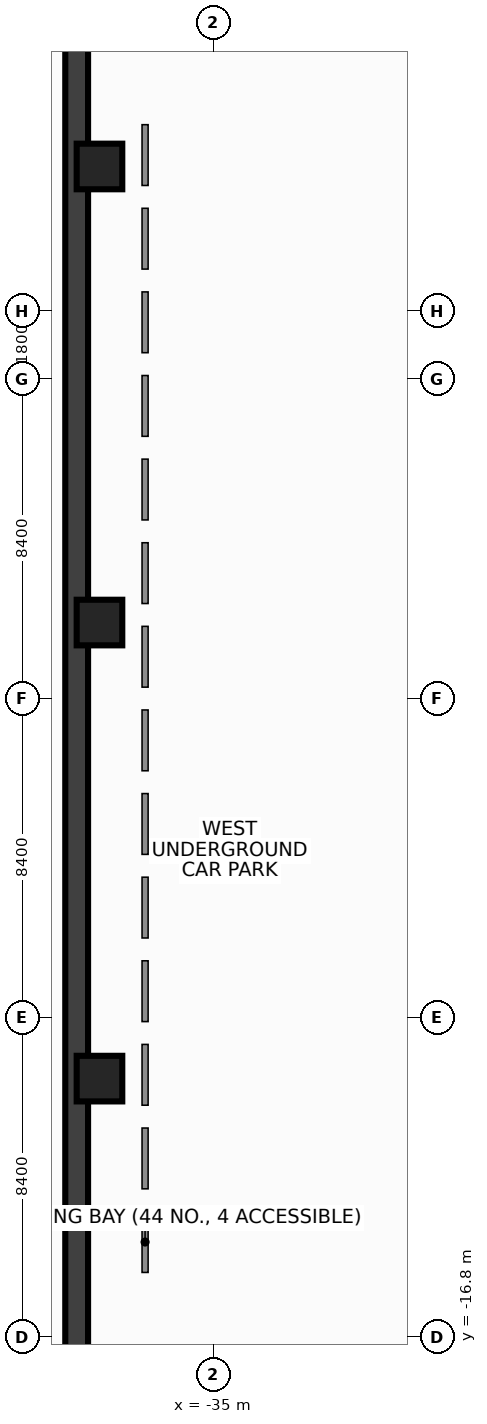
"""IFC4 building model, lengths in metres.
Left out: names, types, materials, properties, quantities, classifications, styles, units other than length and angle.
Written with IfcOpenShell. Run it as: python <this file> out.ifc"""

import sys

from ifc_helpers import new_model, si_unit, direction, frame, frame_2d, origin, origin_2d, place, context, subcontext, project, spatial, rectangle, hollow_rectangle, extrude, source, transform, mapped, element, save


model = new_model("IFC4")
c1 = context("Model", 3, precision=1e-05, world=origin(), true_north=direction((0.0, 1.0)))
c2 = subcontext(c1, "Body", "Model", "MODEL_VIEW")
j1 = project(units=[si_unit("LENGTHUNIT", "METRE"), si_unit("PLANEANGLEUNIT", "RADIAN")], contexts=[c1])
p1 = place(None, origin())
s1 = spatial("IfcSite", under=j1, at=p1, CompositionType="ELEMENT")
p2 = place(p1, origin())
s2 = spatial("IfcBuilding", under=s1, at=p2, CompositionType="ELEMENT")
p3 = place(p2, frame((0.0, 0.0, -11.0)))
s3 = spatial("IfcBuildingStorey", under=s2, at=p3, CompositionType="ELEMENT", Elevation=-11.0)
m1 = source(origin(), c2, "Body", "SweptSolid", [
    extrude(rectangle(XDim=48.8, YDim=0.6, at=frame_2d((24.4, 0.0))), origin(), (0.0, 0.0, 1.0), 5.5),
])
p4 = place(p3, frame((-38.6, -25.3, 0.0), z_axis=(0.0, 0.0, 1.0), x_axis=(0.0, 1.0, 0.0)))
e1 = element("IfcWall", 1, at=p4, inside=s3, PredefinedType="SHEAR", context=c2, shape_type="MappedRepresentation", body=[
    mapped(m1, transform((0.0, 0.0, 0.0), x_axis=(1.0, 0.0, 0.0), y_axis=(0.0, 1.0, 0.0), z_axis=(0.0, 0.0, 1.0), scale=1.0)),
])
m2 = source(origin(), c2, "Body", "SweptSolid", [
    extrude(hollow_rectangle(XDim=1.2, YDim=1.2, WallThickness=0.055, at=origin_2d()), origin(), (0.0, 0.0, 1.0), 5.5),
])
for number, where, z_axis, x_axis in (
    (2, (-38.0, -10.0, 0.0), (0.0, 0.0, 1.0), (1.0, 0.0, 0.0)),
    (3, (-38.0, 2.0, 0.0), (0.0, 0.0, 1.0), (1.0, 0.0, 0.0)),
    (4, (-38.0, 14.0, 0.0), (0.0, 0.0, 1.0), (1.0, 0.0, 0.0)),
):
    element("IfcColumn", number, at=place(p3, frame(where, z_axis=z_axis, x_axis=x_axis)), inside=s3, PredefinedType="COLUMN", context=c2, shape_type="MappedRepresentation", body=[
        mapped(m2, transform((0.0, 0.0, 0.0), x_axis=(1.0, 0.0, 0.0), y_axis=(0.0, 1.0, 0.0), z_axis=(0.0, 0.0, 1.0), scale=1.0)),
    ])
save(model, sys.argv[1])
